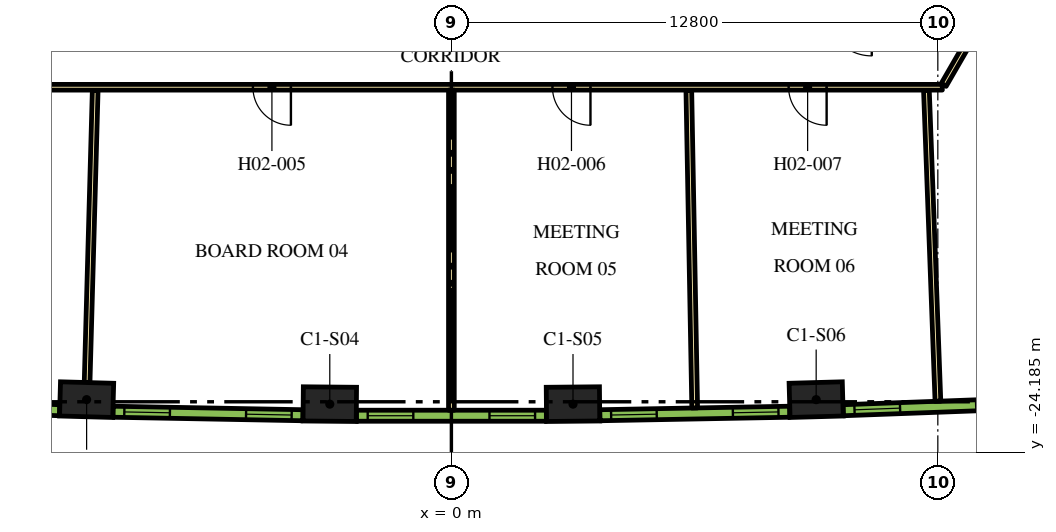
"""IFC4 building model, lengths in metres.
Left out: names, types, materials, properties, quantities, classifications, styles, units other than length and angle.
Written with IfcOpenShell. Run it as: python <this file> out.ifc"""

import sys

from ifc_helpers import new_model, si_unit, direction, frame, frame_2d, origin, origin_2d, place, context, subcontext, project, spatial, rectangle, extrude, element, fill, save


model = new_model("IFC4")
c1 = context("Model", 3, precision=1e-05, world=origin(), true_north=direction((0.0, 1.0)))
c2 = subcontext(c1, "Body", "Model", "MODEL_VIEW")
j1 = project(units=[si_unit("LENGTHUNIT", "METRE"), si_unit("PLANEANGLEUNIT", "RADIAN")], contexts=[c1])
p1 = place(None, origin())
s1 = spatial("IfcSite", under=j1, at=p1, CompositionType="ELEMENT")
p2 = place(p1, origin())
s2 = spatial("IfcBuilding", under=s1, at=p2, CompositionType="ELEMENT")
p3 = place(p2, frame((0.0, 0.0, 39.3)))
s3 = spatial("IfcBuildingStorey", under=s2, at=p3, CompositionType="ELEMENT", Elevation=39.3)
for number, where, z_axis, x_axis in (
    (1, (-9.599, -22.795, 0.0), (0.0, 0.0, 1.0), (1.0, -0.028, 0.0)),
    (2, (-3.2, -22.913, 0.0), (0.0, 0.0, 1.0), (1.0, -0.009, 0.0)),
    (3, (3.2, -22.913, 0.0), (0.0, 0.0, 1.0), (1.0, 0.009, 0.0)),
    (4, (9.599, -22.795, 0.0), (0.0, 0.0, 1.0), (1.0, 0.028, 0.0)),
):
    element("IfcColumn", number, at=place(p3, frame(where, z_axis=z_axis, x_axis=x_axis)), inside=s3, PredefinedType="COLUMN", context=c2, shape_type="SweptSolid", body=[
        extrude(rectangle(XDim=1.4, YDim=0.9, at=origin_2d()), origin(), (0.0, 0.0, 1.0), 3.9),
    ])
p4 = place(p3, frame((12.918, -14.575, 0.0), z_axis=(0.0, 0.0, 1.0), x_axis=(-1.0, 0.0, 0.0)))
e5 = element("IfcWall", 5, at=p4, inside=s3, PredefinedType="PARTITIONING", context=c2, shape_type="SweptSolid", body=[
    extrude(rectangle(XDim=25.766, YDim=0.15, at=frame_2d((12.883, 0.0))), origin(), (0.0, 0.0, 1.0), 2.75),
])
p5 = place(p4, frame((17.141, 0.0, 0.0)))
e6 = element("IfcOpeningElement", 6, at=p5, cuts=e5, PredefinedType="OPENING", context=c2, shape_type="SweptSolid", body=[
    extrude(rectangle(XDim=1.0, YDim=2.1, at=frame_2d((0.5, 1.05))), frame((0.0, 0.085, 0.0), z_axis=(0.0, -1.0, 0.0), x_axis=(1.0, 0.0, 0.0)), (0.0, 0.0, 1.0), 0.17),
])
p6 = place(p4, frame((9.259, 0.0, 0.0)))
e7 = element("IfcOpeningElement", 7, at=p6, cuts=e5, PredefinedType="OPENING", context=c2, shape_type="SweptSolid", body=[
    extrude(rectangle(XDim=1.0, YDim=2.1, at=frame_2d((0.5, 1.05))), frame((0.0, 0.085, 0.0), z_axis=(0.0, -1.0, 0.0), x_axis=(1.0, 0.0, 0.0)), (0.0, 0.0, 1.0), 0.17),
])
p7 = place(p4, frame((3.044, 0.0, 0.0)))
e8 = element("IfcOpeningElement", 8, at=p7, cuts=e5, PredefinedType="OPENING", context=c2, shape_type="SweptSolid", body=[
    extrude(rectangle(XDim=1.0, YDim=2.1, at=frame_2d((0.5, 1.05))), frame((0.0, 0.085, 0.0), z_axis=(0.0, -1.0, 0.0), x_axis=(1.0, 0.0, 0.0)), (0.0, 0.0, 1.0), 0.17),
])
p8 = place(p3, frame((15.587, -9.952, 0.0), z_axis=(0.0, 0.0, 1.0), x_axis=(-0.500016618951, -0.866015808616, 0.0)))
e9 = element("IfcWall", 9, at=p8, inside=s3, PredefinedType="PARTITIONING", context=c2, shape_type="SweptSolid", body=[
    extrude(rectangle(XDim=5.268, YDim=0.15, at=frame_2d((2.634, 0.0))), origin(), (0.0, 0.0, 1.0), 2.75),
])
p9 = place(p8, frame((2.465, 0.0, 0.0)))
e10 = element("IfcOpeningElement", 10, at=p9, cuts=e9, PredefinedType="OPENING", context=c2, shape_type="SweptSolid", body=[
    extrude(rectangle(XDim=0.9, YDim=2.1, at=frame_2d((0.45, 1.05))), frame((0.0, 0.085, 0.0), z_axis=(0.0, -1.0, 0.0), x_axis=(1.0, 0.0, 0.0)), (0.0, 0.0, 1.0), 0.17),
])
p10 = place(p3, frame((-9.586, -22.345, 0.0), z_axis=(0.0, 0.0, 1.0), x_axis=(0.027722115646, 0.999615668297, 0.0)))
e11 = element("IfcWall", 11, at=p10, inside=s3, PredefinedType="PARTITIONING", context=c2, shape_type="SweptSolid", body=[
    extrude(rectangle(XDim=7.688, YDim=0.15, at=frame_2d((3.844, 0.0))), origin(), (0.0, 0.0, 1.0), 2.75),
])
p11 = place(p3, frame((0.0, -23.073, 0.0), z_axis=(0.0, 0.0, 1.0), x_axis=(0.0, 1.0, 0.0)))
e12 = element("IfcWall", 12, at=p11, inside=s3, PredefinedType="PARTITIONING", context=c2, shape_type="SweptSolid", body=[
    extrude(rectangle(XDim=8.423, YDim=0.15, at=frame_2d((4.212, 0.0))), origin(), (0.0, 0.0, 1.0), 2.75),
])
p12 = place(p3, frame((6.402, -23.014, 0.0), z_axis=(0.0, 0.0, 1.0), x_axis=(-0.01849587109, 0.999828936745, 0.0)))
e13 = element("IfcWall", 13, at=p12, inside=s3, PredefinedType="PARTITIONING", context=c2, shape_type="SweptSolid", body=[
    extrude(rectangle(XDim=8.355, YDim=0.15, at=frame_2d((4.178, 0.0))), origin(), (0.0, 0.0, 1.0), 2.75),
])
p13 = place(p3, frame((12.802, -22.836, 0.0), z_axis=(0.0, 0.0, 1.0), x_axis=(-0.036969723281, 0.999316386116, 0.0)))
e14 = element("IfcWall", 14, at=p13, inside=s3, PredefinedType="PARTITIONING", context=c2, shape_type="SweptSolid", body=[
    extrude(rectangle(XDim=8.182, YDim=0.15, at=frame_2d((4.091, 0.0))), origin(), (0.0, 0.0, 1.0), 2.75),
])
p14 = place(p3, frame((-15.305, -22.889, 0.0), z_axis=(0.0, 0.0, 1.0), x_axis=(0.999317974969, -0.036926750529, 0.0)))
e15 = element("IfcWall", 15, at=p14, inside=s3, PredefinedType="SOLIDWALL", context=c2, shape_type="SweptSolid", body=[
    extrude(rectangle(XDim=4.998, YDim=0.29, at=frame_2d((2.499, 0.0))), origin(), (0.0, 0.0, 1.0), 3.65),
])
p15 = place(p14, frame((0.297, 0.0, 0.9)))
e16 = element("IfcOpeningElement", 16, at=p15, cuts=e15, PredefinedType="OPENING", context=c2, shape_type="SweptSolid", body=[
    extrude(rectangle(XDim=1.2, YDim=2.15, at=frame_2d((0.6, 1.075))), frame((0.0, 0.155, 0.0), z_axis=(0.0, -1.0, 0.0), x_axis=(1.0, 0.0, 0.0)), (0.0, 0.0, 1.0), 0.31),
])
p16 = place(p14, frame((3.501, 0.0, 0.9)))
e17 = element("IfcOpeningElement", 17, at=p16, cuts=e15, PredefinedType="OPENING", context=c2, shape_type="SweptSolid", body=[
    extrude(rectangle(XDim=1.2, YDim=2.15, at=frame_2d((0.6, 1.075))), frame((0.0, 0.155, 0.0), z_axis=(0.0, -1.0, 0.0), x_axis=(1.0, 0.0, 0.0)), (0.0, 0.0, 1.0), 0.31),
])
p17 = place(p3, frame((-8.904, -23.113, 0.0), z_axis=(0.0, 0.0, 1.0), x_axis=(0.999829529479, -0.018463801951, 0.0)))
e18 = element("IfcWall", 18, at=p17, inside=s3, PredefinedType="SOLIDWALL", context=c2, shape_type="SweptSolid", body=[
    extrude(rectangle(XDim=4.998, YDim=0.29, at=frame_2d((2.499, 0.0))), origin(), (0.0, 0.0, 1.0), 3.65),
])
p18 = place(p17, frame((0.297, 0.0, 0.9)))
e19 = element("IfcOpeningElement", 19, at=p18, cuts=e18, PredefinedType="OPENING", context=c2, shape_type="SweptSolid", body=[
    extrude(rectangle(XDim=1.2, YDim=2.15, at=frame_2d((0.6, 1.075))), frame((0.0, 0.155, 0.0), z_axis=(0.0, -1.0, 0.0), x_axis=(1.0, 0.0, 0.0)), (0.0, 0.0, 1.0), 0.31),
])
p19 = place(p17, frame((3.501, 0.0, 0.9)))
e20 = element("IfcOpeningElement", 20, at=p19, cuts=e18, PredefinedType="OPENING", context=c2, shape_type="SweptSolid", body=[
    extrude(rectangle(XDim=1.2, YDim=2.15, at=frame_2d((0.6, 1.075))), frame((0.0, 0.155, 0.0), z_axis=(0.0, -1.0, 0.0), x_axis=(1.0, 0.0, 0.0)), (0.0, 0.0, 1.0), 0.31),
])
p20 = place(p3, frame((-2.499, -23.218, 0.0), z_axis=(0.0, 0.0, 1.0), x_axis=(1.0, 0.0, 0.0)))
e21 = element("IfcWall", 21, at=p20, inside=s3, PredefinedType="SOLIDWALL", context=c2, shape_type="SweptSolid", body=[
    extrude(rectangle(XDim=4.998, YDim=0.29, at=frame_2d((2.499, 0.0))), origin(), (0.0, 0.0, 1.0), 3.65),
])
p21 = place(p20, frame((0.297, 0.0, 0.9)))
e22 = element("IfcOpeningElement", 22, at=p21, cuts=e21, PredefinedType="OPENING", context=c2, shape_type="SweptSolid", body=[
    extrude(rectangle(XDim=1.2, YDim=2.15, at=frame_2d((0.6, 1.075))), frame((0.0, 0.155, 0.0), z_axis=(0.0, -1.0, 0.0), x_axis=(1.0, 0.0, 0.0)), (0.0, 0.0, 1.0), 0.31),
])
p22 = place(p20, frame((3.501, 0.0, 0.9)))
e23 = element("IfcOpeningElement", 23, at=p22, cuts=e21, PredefinedType="OPENING", context=c2, shape_type="SweptSolid", body=[
    extrude(rectangle(XDim=1.2, YDim=2.15, at=frame_2d((0.6, 1.075))), frame((0.0, 0.155, 0.0), z_axis=(0.0, -1.0, 0.0), x_axis=(1.0, 0.0, 0.0)), (0.0, 0.0, 1.0), 0.31),
])
p23 = place(p3, frame((3.906, -23.205, 0.0), z_axis=(0.0, 0.0, 1.0), x_axis=(0.999829529479, 0.018463801951, 0.0)))
e24 = element("IfcWall", 24, at=p23, inside=s3, PredefinedType="SOLIDWALL", context=c2, shape_type="SweptSolid", body=[
    extrude(rectangle(XDim=4.998, YDim=0.29, at=frame_2d((2.499, 0.0))), origin(), (0.0, 0.0, 1.0), 3.65),
])
p24 = place(p23, frame((0.297, 0.0, 0.9)))
e25 = element("IfcOpeningElement", 25, at=p24, cuts=e24, PredefinedType="OPENING", context=c2, shape_type="SweptSolid", body=[
    extrude(rectangle(XDim=1.2, YDim=2.15, at=frame_2d((0.6, 1.075))), frame((0.0, 0.155, 0.0), z_axis=(0.0, -1.0, 0.0), x_axis=(1.0, 0.0, 0.0)), (0.0, 0.0, 1.0), 0.31),
])
p25 = place(p23, frame((3.501, 0.0, 0.9)))
e26 = element("IfcOpeningElement", 26, at=p25, cuts=e24, PredefinedType="OPENING", context=c2, shape_type="SweptSolid", body=[
    extrude(rectangle(XDim=1.2, YDim=2.15, at=frame_2d((0.6, 1.075))), frame((0.0, 0.155, 0.0), z_axis=(0.0, -1.0, 0.0), x_axis=(1.0, 0.0, 0.0)), (0.0, 0.0, 1.0), 0.31),
])
p26 = place(p3, frame((10.31, -23.074, 0.0), z_axis=(0.0, 0.0, 1.0), x_axis=(0.999317974969, 0.036926750529, 0.0)))
e27 = element("IfcWall", 27, at=p26, inside=s3, PredefinedType="SOLIDWALL", context=c2, shape_type="SweptSolid", body=[
    extrude(rectangle(XDim=4.998, YDim=0.29, at=frame_2d((2.499, 0.0))), origin(), (0.0, 0.0, 1.0), 3.65),
])
p27 = place(p26, frame((0.297, 0.0, 0.9)))
e28 = element("IfcOpeningElement", 28, at=p27, cuts=e27, PredefinedType="OPENING", context=c2, shape_type="SweptSolid", body=[
    extrude(rectangle(XDim=1.2, YDim=2.15, at=frame_2d((0.6, 1.075))), frame((0.0, 0.155, 0.0), z_axis=(0.0, -1.0, 0.0), x_axis=(1.0, 0.0, 0.0)), (0.0, 0.0, 1.0), 0.31),
])
p28 = place(p26, frame((3.501, 0.0, 0.9)))
e29 = element("IfcOpeningElement", 29, at=p28, cuts=e27, PredefinedType="OPENING", context=c2, shape_type="SweptSolid", body=[
    extrude(rectangle(XDim=1.2, YDim=2.15, at=frame_2d((0.6, 1.075))), frame((0.0, 0.155, 0.0), z_axis=(0.0, -1.0, 0.0), x_axis=(1.0, 0.0, 0.0)), (0.0, 0.0, 1.0), 0.31),
])
p29 = place(p5, origin())
e30 = element("IfcDoor", 30, at=p29, inside=s3, OperationType="SINGLE_SWING_RIGHT", PredefinedType="DOOR", context=c2, shape_type="SweptSolid", body=[
    extrude(rectangle(XDim=1.0, YDim=2.1, at=frame_2d((0.5, 1.05))), frame((0.0, 0.025, 0.0), z_axis=(0.0, -1.0, 0.0), x_axis=(1.0, 0.0, 0.0)), (0.0, 0.0, 1.0), 0.05),
])
fill(e6, e30)
p30 = place(p6, origin())
e31 = element("IfcDoor", 31, at=p30, inside=s3, OperationType="SINGLE_SWING_LEFT", PredefinedType="DOOR", context=c2, shape_type="SweptSolid", body=[
    extrude(rectangle(XDim=1.0, YDim=2.1, at=frame_2d((0.5, 1.05))), frame((0.0, 0.025, 0.0), z_axis=(0.0, -1.0, 0.0), x_axis=(1.0, 0.0, 0.0)), (0.0, 0.0, 1.0), 0.05),
])
fill(e7, e31)
p31 = place(p7, origin())
e32 = element("IfcDoor", 32, at=p31, inside=s3, OperationType="SINGLE_SWING_RIGHT", PredefinedType="DOOR", context=c2, shape_type="SweptSolid", body=[
    extrude(rectangle(XDim=1.0, YDim=2.1, at=frame_2d((0.5, 1.05))), frame((0.0, 0.025, 0.0), z_axis=(0.0, -1.0, 0.0), x_axis=(1.0, 0.0, 0.0)), (0.0, 0.0, 1.0), 0.05),
])
fill(e8, e32)
p32 = place(p18, origin())
e33 = element("IfcWindow", 33, at=p32, inside=s3, PartitioningType="DOUBLE_PANEL_VERTICAL", PredefinedType="WINDOW", context=c2, shape_type="SweptSolid", body=[
    extrude(rectangle(XDim=1.2, YDim=2.15, at=frame_2d((0.6, 1.075))), frame((0.0, 0.015, 0.0), z_axis=(0.0, -1.0, 0.0), x_axis=(1.0, 0.0, 0.0)), (0.0, 0.0, 1.0), 0.06),
])
fill(e19, e33)
p33 = place(p19, origin())
e34 = element("IfcWindow", 34, at=p33, inside=s3, PartitioningType="DOUBLE_PANEL_VERTICAL", PredefinedType="WINDOW", context=c2, shape_type="SweptSolid", body=[
    extrude(rectangle(XDim=1.2, YDim=2.15, at=frame_2d((0.6, 1.075))), frame((0.0, 0.015, 0.0), z_axis=(0.0, -1.0, 0.0), x_axis=(1.0, 0.0, 0.0)), (0.0, 0.0, 1.0), 0.06),
])
fill(e20, e34)
p34 = place(p21, origin())
e35 = element("IfcWindow", 35, at=p34, inside=s3, PartitioningType="DOUBLE_PANEL_VERTICAL", PredefinedType="WINDOW", context=c2, shape_type="SweptSolid", body=[
    extrude(rectangle(XDim=1.2, YDim=2.15, at=frame_2d((0.6, 1.075))), frame((0.0, 0.015, 0.0), z_axis=(0.0, -1.0, 0.0), x_axis=(1.0, 0.0, 0.0)), (0.0, 0.0, 1.0), 0.06),
])
fill(e22, e35)
p35 = place(p22, origin())
e36 = element("IfcWindow", 36, at=p35, inside=s3, PartitioningType="DOUBLE_PANEL_VERTICAL", PredefinedType="WINDOW", context=c2, shape_type="SweptSolid", body=[
    extrude(rectangle(XDim=1.2, YDim=2.15, at=frame_2d((0.6, 1.075))), frame((0.0, 0.015, 0.0), z_axis=(0.0, -1.0, 0.0), x_axis=(1.0, 0.0, 0.0)), (0.0, 0.0, 1.0), 0.06),
])
fill(e23, e36)
p36 = place(p24, origin())
e37 = element("IfcWindow", 37, at=p36, inside=s3, PartitioningType="DOUBLE_PANEL_VERTICAL", PredefinedType="WINDOW", context=c2, shape_type="SweptSolid", body=[
    extrude(rectangle(XDim=1.2, YDim=2.15, at=frame_2d((0.6, 1.075))), frame((0.0, 0.015, 0.0), z_axis=(0.0, -1.0, 0.0), x_axis=(1.0, 0.0, 0.0)), (0.0, 0.0, 1.0), 0.06),
])
fill(e25, e37)
p37 = place(p25, origin())
e38 = element("IfcWindow", 38, at=p37, inside=s3, PartitioningType="DOUBLE_PANEL_VERTICAL", PredefinedType="WINDOW", context=c2, shape_type="SweptSolid", body=[
    extrude(rectangle(XDim=1.2, YDim=2.15, at=frame_2d((0.6, 1.075))), frame((0.0, 0.015, 0.0), z_axis=(0.0, -1.0, 0.0), x_axis=(1.0, 0.0, 0.0)), (0.0, 0.0, 1.0), 0.06),
])
fill(e26, e38)
p38 = place(p27, origin())
e39 = element("IfcWindow", 39, at=p38, inside=s3, PartitioningType="DOUBLE_PANEL_VERTICAL", PredefinedType="WINDOW", context=c2, shape_type="SweptSolid", body=[
    extrude(rectangle(XDim=1.2, YDim=2.15, at=frame_2d((0.6, 1.075))), frame((0.0, 0.015, 0.0), z_axis=(0.0, -1.0, 0.0), x_axis=(1.0, 0.0, 0.0)), (0.0, 0.0, 1.0), 0.06),
])
fill(e28, e39)
save(model, sys.argv[1])
